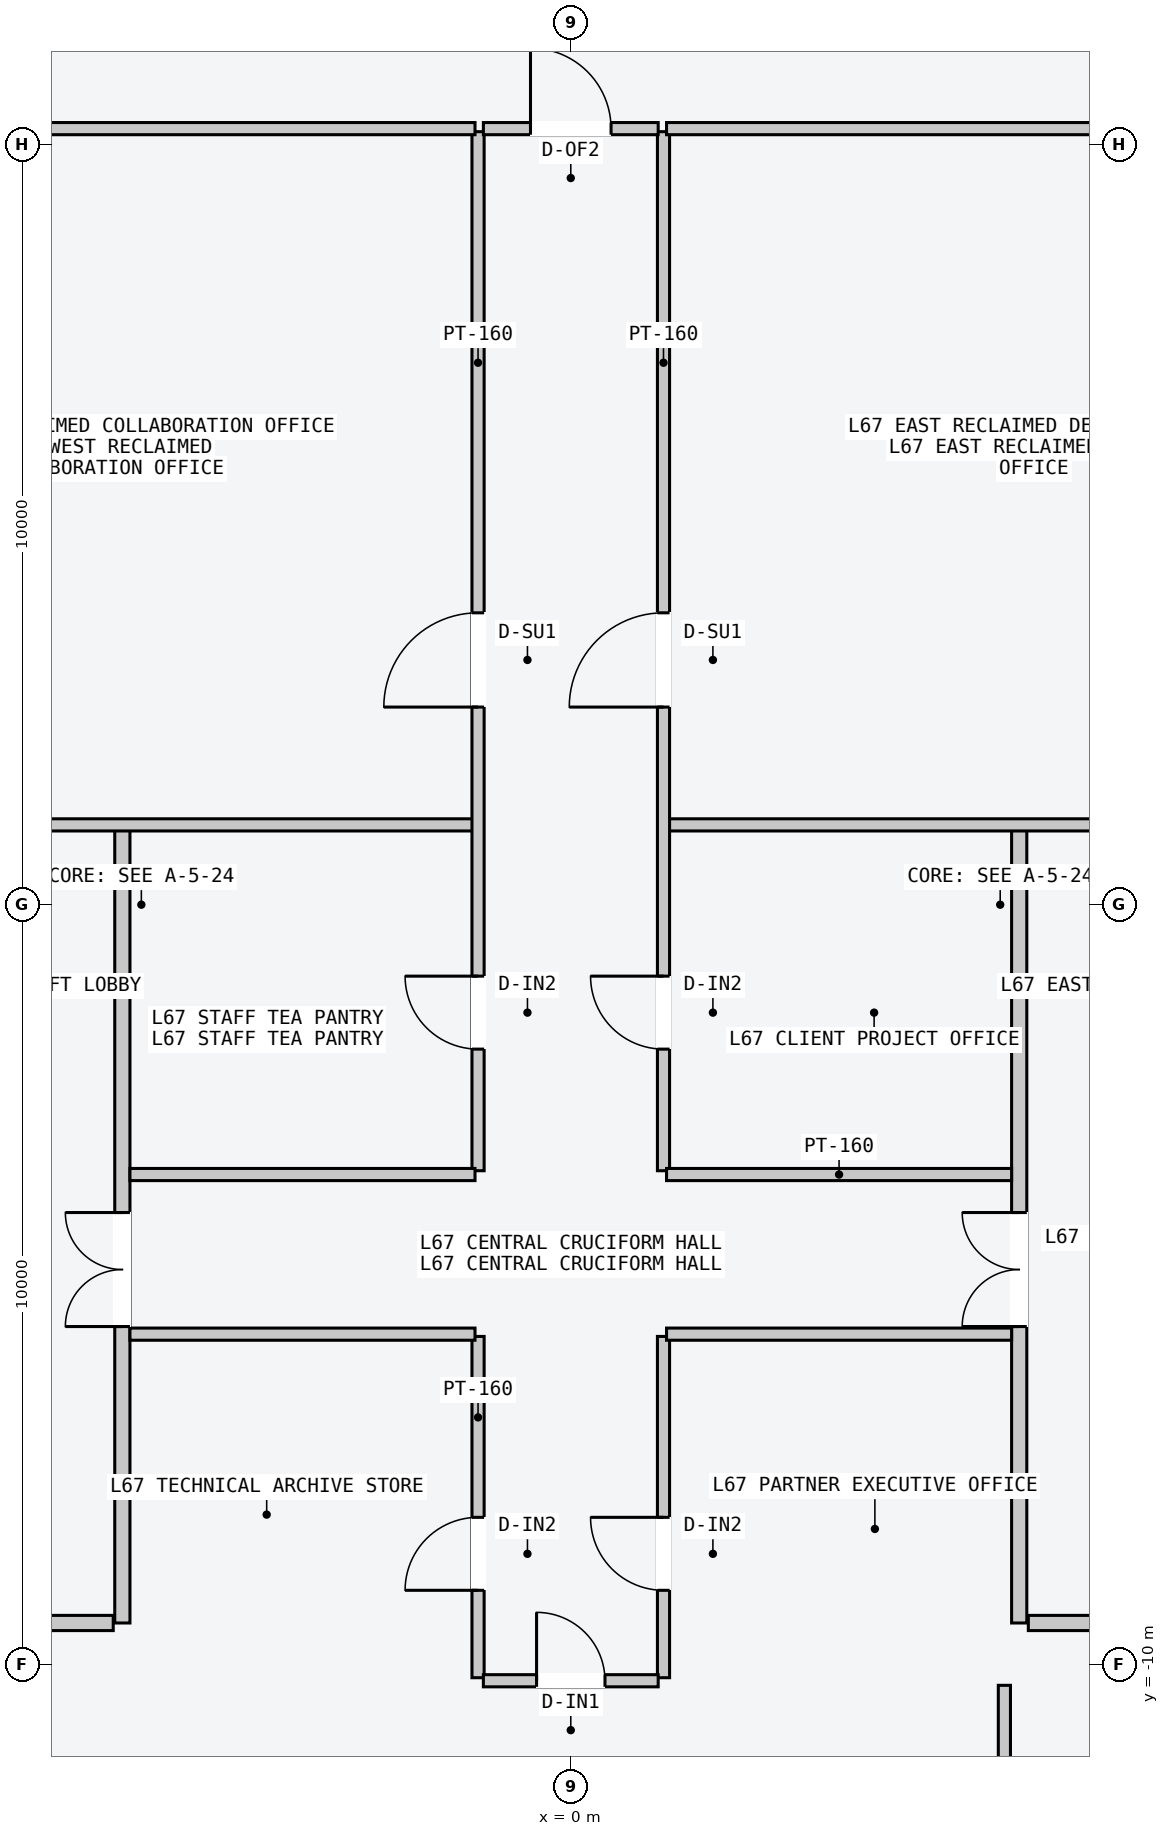
"""IFC4 building model, lengths in metres.
Left out: names, types, materials, properties, quantities, classifications, styles, units other than length and angle.
Written with IfcOpenShell. Run it as: python <this file> out.ifc"""

import sys

from ifc_helpers import new_model, si_unit, direction, frame, frame_2d, origin, place, context, subcontext, project, spatial, rectangle, extrude, element, fill, save


model = new_model("IFC4")
c1 = context("Model", 3, precision=1e-05, world=origin(), true_north=direction((0.0, 1.0)))
c2 = subcontext(c1, "Body", "Model", "MODEL_VIEW")
j1 = project(units=[si_unit("LENGTHUNIT", "METRE"), si_unit("PLANEANGLEUNIT", "RADIAN")], contexts=[c1])
p1 = place(None, origin())
s1 = spatial("IfcSite", under=j1, at=p1, CompositionType="ELEMENT")
p2 = place(p1, origin())
s2 = spatial("IfcBuilding", under=s1, at=p2, CompositionType="ELEMENT")
p3 = place(p2, frame((0.0, 0.0, 254.4)))
s3 = spatial("IfcBuildingStorey", under=s2, at=p3, CompositionType="ELEMENT", Elevation=254.4)
p4 = place(p3, frame((-5.9, -9.45, 0.0), z_axis=(0.0, 0.0, 1.0), x_axis=(0.0, 1.0, 0.0)))
e1 = element("IfcWall", 1, at=p4, inside=s3, PredefinedType="PARTITIONING", context=c2, shape_type="SweptSolid", body=[
    extrude(rectangle(XDim=10.5, YDim=0.2, at=frame_2d((5.25, 0.0))), origin(), (0.0, 0.0, 1.0), 3.4),
])
p5 = place(p4, frame((3.9, 0.0, 0.0)))
e2 = element("IfcOpeningElement", 2, at=p5, cuts=e1, PredefinedType="OPENING", context=c2, shape_type="SweptSolid", body=[
    extrude(rectangle(XDim=1.5, YDim=2.2, at=frame_2d((0.75, 1.1))), frame((0.0, 0.11, 0.0), z_axis=(0.0, -1.0, 0.0), x_axis=(1.0, 0.0, 0.0)), (0.0, 0.0, 1.0), 0.22),
])
p6 = place(p3, frame((-6.02, -9.45, 0.0), z_axis=(0.0, 0.0, 1.0), x_axis=(-1.0, 0.0, 0.0)))
e3 = element("IfcWall", 3, at=p6, inside=s3, PredefinedType="PARTITIONING", context=c2, shape_type="SweptSolid", body=[
    extrude(rectangle(XDim=1.8, YDim=0.2, at=frame_2d((0.9, 0.0))), origin(), (0.0, 0.0, 1.0), 3.4),
])
p7 = place(p3, frame((5.9, -9.45, 0.0), z_axis=(0.0, 0.0, 1.0), x_axis=(0.0, 1.0, 0.0)))
e4 = element("IfcWall", 4, at=p7, inside=s3, PredefinedType="PARTITIONING", context=c2, shape_type="SweptSolid", body=[
    extrude(rectangle(XDim=10.5, YDim=0.2, at=frame_2d((5.25, 0.0))), origin(), (0.0, 0.0, 1.0), 3.4),
])
p8 = place(p7, frame((3.9, 0.0, 0.0)))
e5 = element("IfcOpeningElement", 5, at=p8, cuts=e4, PredefinedType="OPENING", context=c2, shape_type="SweptSolid", body=[
    extrude(rectangle(XDim=1.5, YDim=2.2, at=frame_2d((0.75, 1.1))), frame((0.0, 0.11, 0.0), z_axis=(0.0, -1.0, 0.0), x_axis=(1.0, 0.0, 0.0)), (0.0, 0.0, 1.0), 0.22),
])
p9 = place(p3, frame((6.02, -9.45, 0.0), z_axis=(0.0, 0.0, 1.0), x_axis=(1.0, 0.0, 0.0)))
e6 = element("IfcWall", 6, at=p9, inside=s3, PredefinedType="PARTITIONING", context=c2, shape_type="SweptSolid", body=[
    extrude(rectangle(XDim=1.8, YDim=0.2, at=frame_2d((0.9, 0.0))), origin(), (0.0, 0.0, 1.0), 3.4),
])
p10 = place(p3, frame((-10.05, 1.05, 0.0), z_axis=(0.0, 0.0, 1.0), x_axis=(1.0, 0.0, 0.0)))
e7 = element("IfcWall", 7, at=p10, inside=s3, PredefinedType="PARTITIONING", context=c2, shape_type="SweptSolid", body=[
    extrude(rectangle(XDim=8.79, YDim=0.16, at=frame_2d((4.395, 0.0))), origin(), (0.0, 0.0, 1.0), 3.4),
])
p11 = place(p3, frame((-1.22, -3.5, 0.0), z_axis=(0.0, 0.0, 1.0), x_axis=(0.0, 1.0, 0.0)))
e8 = element("IfcWall", 8, at=p11, inside=s3, PredefinedType="PARTITIONING", context=c2, shape_type="SweptSolid", body=[
    extrude(rectangle(XDim=13.67, YDim=0.16, at=frame_2d((6.835, 0.0))), origin(), (0.0, 0.0, 1.0), 3.4),
])
p12 = place(p11, frame((6.1, 0.0, 0.0)))
e9 = element("IfcOpeningElement", 9, at=p12, cuts=e8, PredefinedType="OPENING", context=c2, shape_type="SweptSolid", body=[
    extrude(rectangle(XDim=1.24, YDim=2.24, at=frame_2d((0.62, 1.12))), frame((0.0, 0.09, 0.0), z_axis=(0.0, -1.0, 0.0), x_axis=(1.0, 0.0, 0.0)), (0.0, 0.0, 1.0), 0.18),
])
p13 = place(p11, frame((1.6, 0.0, 0.0)))
e10 = element("IfcOpeningElement", 10, at=p13, cuts=e8, PredefinedType="OPENING", context=c2, shape_type="SweptSolid", body=[
    extrude(rectangle(XDim=0.96, YDim=2.18, at=frame_2d((0.48, 1.09))), frame((0.0, 0.09, 0.0), z_axis=(0.0, -1.0, 0.0), x_axis=(1.0, 0.0, 0.0)), (0.0, 0.0, 1.0), 0.18),
])
p14 = place(p3, frame((-7.5, 10.21, 0.0), z_axis=(0.0, 0.0, 1.0), x_axis=(1.0, 0.0, 0.0)))
e11 = element("IfcWall", 11, at=p14, inside=s3, PredefinedType="PARTITIONING", context=c2, shape_type="SweptSolid", body=[
    extrude(rectangle(XDim=6.24, YDim=0.16, at=frame_2d((3.12, 0.0))), origin(), (0.0, 0.0, 1.0), 3.4),
])
p15 = place(p3, frame((-5.8, -3.55, 0.0), z_axis=(0.0, 0.0, 1.0), x_axis=(1.0, 0.0, 0.0)))
e12 = element("IfcWall", 12, at=p15, inside=s3, PredefinedType="PARTITIONING", context=c2, shape_type="SweptSolid", body=[
    extrude(rectangle(XDim=4.54, YDim=0.16, at=frame_2d((2.27, 0.0))), origin(), (0.0, 0.0, 1.0), 3.4),
])
p16 = place(p3, frame((1.26, 1.05, 0.0), z_axis=(0.0, 0.0, 1.0), x_axis=(1.0, 0.0, 0.0)))
e13 = element("IfcWall", 13, at=p16, inside=s3, PredefinedType="PARTITIONING", context=c2, shape_type="SweptSolid", body=[
    extrude(rectangle(XDim=8.8, YDim=0.16, at=frame_2d((4.4, 0.0))), origin(), (0.0, 0.0, 1.0), 3.4),
])
p17 = place(p3, frame((1.22, -3.5, 0.0), z_axis=(0.0, 0.0, 1.0), x_axis=(0.0, 1.0, 0.0)))
e14 = element("IfcWall", 14, at=p17, inside=s3, PredefinedType="PARTITIONING", context=c2, shape_type="SweptSolid", body=[
    extrude(rectangle(XDim=13.67, YDim=0.16, at=frame_2d((6.835, 0.0))), origin(), (0.0, 0.0, 1.0), 3.4),
])
p18 = place(p17, frame((6.1, 0.0, 0.0)))
e15 = element("IfcOpeningElement", 15, at=p18, cuts=e14, PredefinedType="OPENING", context=c2, shape_type="SweptSolid", body=[
    extrude(rectangle(XDim=1.24, YDim=2.24, at=frame_2d((0.62, 1.12))), frame((0.0, 0.09, 0.0), z_axis=(0.0, -1.0, 0.0), x_axis=(1.0, 0.0, 0.0)), (0.0, 0.0, 1.0), 0.18),
])
p19 = place(p17, frame((1.6, 0.0, 0.0)))
e16 = element("IfcOpeningElement", 16, at=p19, cuts=e14, PredefinedType="OPENING", context=c2, shape_type="SweptSolid", body=[
    extrude(rectangle(XDim=0.96, YDim=2.18, at=frame_2d((0.48, 1.09))), frame((0.0, 0.09, 0.0), z_axis=(0.0, -1.0, 0.0), x_axis=(1.0, 0.0, 0.0)), (0.0, 0.0, 1.0), 0.18),
])
p20 = place(p3, frame((1.26, 10.21, 0.0), z_axis=(0.0, 0.0, 1.0), x_axis=(1.0, 0.0, 0.0)))
e17 = element("IfcWall", 17, at=p20, inside=s3, PredefinedType="PARTITIONING", context=c2, shape_type="SweptSolid", body=[
    extrude(rectangle(XDim=6.24, YDim=0.16, at=frame_2d((3.12, 0.0))), origin(), (0.0, 0.0, 1.0), 3.4),
])
p21 = place(p3, frame((1.26, -3.55, 0.0), z_axis=(0.0, 0.0, 1.0), x_axis=(1.0, 0.0, 0.0)))
e18 = element("IfcWall", 18, at=p21, inside=s3, PredefinedType="PARTITIONING", context=c2, shape_type="SweptSolid", body=[
    extrude(rectangle(XDim=4.54, YDim=0.16, at=frame_2d((2.27, 0.0))), origin(), (0.0, 0.0, 1.0), 3.4),
])
p22 = place(p3, frame((-1.22, -10.17, 0.0), z_axis=(0.0, 0.0, 1.0), x_axis=(0.0, 1.0, 0.0)))
e19 = element("IfcWall", 19, at=p22, inside=s3, PredefinedType="PARTITIONING", context=c2, shape_type="SweptSolid", body=[
    extrude(rectangle(XDim=4.49, YDim=0.16, at=frame_2d((2.245, 0.0))), origin(), (0.0, 0.0, 1.0), 3.4),
])
p23 = place(p22, frame((1.15, 0.0, 0.0)))
e20 = element("IfcOpeningElement", 20, at=p23, cuts=e19, PredefinedType="OPENING", context=c2, shape_type="SweptSolid", body=[
    extrude(rectangle(XDim=0.96, YDim=2.18, at=frame_2d((0.48, 1.09))), frame((0.0, 0.09, 0.0), z_axis=(0.0, -1.0, 0.0), x_axis=(1.0, 0.0, 0.0)), (0.0, 0.0, 1.0), 0.18),
])
p24 = place(p3, frame((1.22, -10.17, 0.0), z_axis=(0.0, 0.0, 1.0), x_axis=(0.0, 1.0, 0.0)))
e21 = element("IfcWall", 21, at=p24, inside=s3, PredefinedType="PARTITIONING", context=c2, shape_type="SweptSolid", body=[
    extrude(rectangle(XDim=4.49, YDim=0.16, at=frame_2d((2.245, 0.0))), origin(), (0.0, 0.0, 1.0), 3.4),
])
p25 = place(p24, frame((1.15, 0.0, 0.0)))
e22 = element("IfcOpeningElement", 22, at=p25, cuts=e21, PredefinedType="OPENING", context=c2, shape_type="SweptSolid", body=[
    extrude(rectangle(XDim=0.96, YDim=2.18, at=frame_2d((0.48, 1.09))), frame((0.0, 0.09, 0.0), z_axis=(0.0, -1.0, 0.0), x_axis=(1.0, 0.0, 0.0)), (0.0, 0.0, 1.0), 0.18),
])
for number, where, z_axis, x_axis in (
    (23, (-5.8, -5.65, 0.0), (0.0, 0.0, 1.0), (1.0, 0.0, 0.0)),
    (24, (1.26, -5.65, 0.0), (0.0, 0.0, 1.0), (1.0, 0.0, 0.0)),
):
    element("IfcWall", number, at=place(p3, frame(where, z_axis=z_axis, x_axis=x_axis)), inside=s3, PredefinedType="PARTITIONING", context=c2, shape_type="SweptSolid", body=[
        extrude(rectangle(XDim=4.54, YDim=0.16, at=frame_2d((2.27, 0.0))), origin(), (0.0, 0.0, 1.0), 3.4),
    ])
p26 = place(p3, frame((-1.15, 10.21, 0.0), z_axis=(0.0, 0.0, 1.0), x_axis=(1.0, 0.0, 0.0)))
e25 = element("IfcWall", 25, at=p26, inside=s3, PredefinedType="PARTITIONING", context=c2, shape_type="SweptSolid", body=[
    extrude(rectangle(XDim=2.3, YDim=0.16, at=frame_2d((1.15, 0.0))), origin(), (0.0, 0.0, 1.0), 3.4),
])
p27 = place(p26, frame((0.62, 0.0, 0.0)))
e26 = element("IfcOpeningElement", 26, at=p27, cuts=e25, PredefinedType="OPENING", context=c2, shape_type="SweptSolid", body=[
    extrude(rectangle(XDim=1.06, YDim=2.2, at=frame_2d((0.53, 1.1))), frame((0.0, 0.09, 0.0), z_axis=(0.0, -1.0, 0.0), x_axis=(1.0, 0.0, 0.0)), (0.0, 0.0, 1.0), 0.18),
])
p28 = place(p3, frame((5.705, -17.56, 0.0), z_axis=(0.0, 0.0, 1.0), x_axis=(0.0, 1.0, 0.0)))
e27 = element("IfcWall", 27, at=p28, inside=s3, PredefinedType="PARTITIONING", context=c2, shape_type="SweptSolid", body=[
    extrude(rectangle(XDim=7.29, YDim=0.16, at=frame_2d((3.645, 0.0))), origin(), (0.0, 0.0, 1.0), 3.4),
])
p29 = place(p28, frame((1.05, 0.0, 0.0)))
e28 = element("IfcOpeningElement", 28, at=p29, cuts=e27, PredefinedType="OPENING", context=c2, shape_type="SweptSolid", body=[
    extrude(rectangle(XDim=0.96, YDim=2.18, at=frame_2d((0.48, 1.09))), frame((0.0, 0.09, 0.0), z_axis=(0.0, -1.0, 0.0), x_axis=(1.0, 0.0, 0.0)), (0.0, 0.0, 1.0), 0.18),
])
p30 = place(p3, frame((-1.15, -10.21, 0.0), z_axis=(0.0, 0.0, 1.0), x_axis=(1.0, 0.0, 0.0)))
e29 = element("IfcWall", 29, at=p30, inside=s3, PredefinedType="PARTITIONING", context=c2, shape_type="SweptSolid", body=[
    extrude(rectangle(XDim=2.3, YDim=0.16, at=frame_2d((1.15, 0.0))), origin(), (0.0, 0.0, 1.0), 3.4),
])
p31 = place(p30, frame((0.7, 0.0, 0.0)))
e30 = element("IfcOpeningElement", 30, at=p31, cuts=e29, PredefinedType="OPENING", context=c2, shape_type="SweptSolid", body=[
    extrude(rectangle(XDim=0.9, YDim=2.15, at=frame_2d((0.45, 1.075))), frame((0.0, 0.09, 0.0), z_axis=(0.0, -1.0, 0.0), x_axis=(1.0, 0.0, 0.0)), (0.0, 0.0, 1.0), 0.18),
])
p32 = place(p5, origin())
e31 = element("IfcDoor", 31, at=p32, inside=s3, OperationType="DOUBLE_DOOR_SINGLE_SWING", PredefinedType="DOOR", context=c2, shape_type="SweptSolid", body=[
    extrude(rectangle(XDim=1.5, YDim=2.2, at=frame_2d((0.75, 1.1))), frame((0.0, 0.025, 0.0), z_axis=(0.0, -1.0, 0.0), x_axis=(1.0, 0.0, 0.0)), (0.0, 0.0, 1.0), 0.05),
])
fill(e2, e31)
p33 = place(p8, origin())
e32 = element("IfcDoor", 32, at=p33, inside=s3, OperationType="DOUBLE_DOOR_SINGLE_SWING", PredefinedType="DOOR", context=c2, shape_type="SweptSolid", body=[
    extrude(rectangle(XDim=1.5, YDim=2.2, at=frame_2d((0.75, 1.1))), frame((0.0, 0.025, 0.0), z_axis=(0.0, -1.0, 0.0), x_axis=(1.0, 0.0, 0.0)), (0.0, 0.0, 1.0), 0.05),
])
fill(e5, e32)
p34 = place(p12, origin())
e33 = element("IfcDoor", 33, at=p34, inside=s3, OperationType="SINGLE_SWING_LEFT", PredefinedType="DOOR", context=c2, shape_type="SweptSolid", body=[
    extrude(rectangle(XDim=1.24, YDim=2.24, at=frame_2d((0.62, 1.12))), frame((0.0, 0.025, 0.0), z_axis=(0.0, -1.0, 0.0), x_axis=(1.0, 0.0, 0.0)), (0.0, 0.0, 1.0), 0.05),
])
fill(e9, e33)
p35 = place(p13, origin())
e34 = element("IfcDoor", 34, at=p35, inside=s3, OperationType="SINGLE_SWING_RIGHT", PredefinedType="DOOR", context=c2, shape_type="SweptSolid", body=[
    extrude(rectangle(XDim=0.96, YDim=2.18, at=frame_2d((0.48, 1.09))), frame((0.0, 0.025, 0.0), z_axis=(0.0, -1.0, 0.0), x_axis=(1.0, 0.0, 0.0)), (0.0, 0.0, 1.0), 0.05),
])
fill(e10, e34)
p36 = place(p18, origin())
e35 = element("IfcDoor", 35, at=p36, inside=s3, OperationType="SINGLE_SWING_LEFT", PredefinedType="DOOR", context=c2, shape_type="SweptSolid", body=[
    extrude(rectangle(XDim=1.24, YDim=2.24, at=frame_2d((0.62, 1.12))), frame((0.0, 0.025, 0.0), z_axis=(0.0, -1.0, 0.0), x_axis=(1.0, 0.0, 0.0)), (0.0, 0.0, 1.0), 0.05),
])
fill(e15, e35)
p37 = place(p19, origin())
e36 = element("IfcDoor", 36, at=p37, inside=s3, OperationType="SINGLE_SWING_RIGHT", PredefinedType="DOOR", context=c2, shape_type="SweptSolid", body=[
    extrude(rectangle(XDim=0.96, YDim=2.18, at=frame_2d((0.48, 1.09))), frame((0.0, 0.025, 0.0), z_axis=(0.0, -1.0, 0.0), x_axis=(1.0, 0.0, 0.0)), (0.0, 0.0, 1.0), 0.05),
])
fill(e16, e36)
p38 = place(p23, origin())
e37 = element("IfcDoor", 37, at=p38, inside=s3, OperationType="SINGLE_SWING_LEFT", PredefinedType="DOOR", context=c2, shape_type="SweptSolid", body=[
    extrude(rectangle(XDim=0.96, YDim=2.18, at=frame_2d((0.48, 1.09))), frame((0.0, 0.025, 0.0), z_axis=(0.0, -1.0, 0.0), x_axis=(1.0, 0.0, 0.0)), (0.0, 0.0, 1.0), 0.05),
])
fill(e20, e37)
p39 = place(p25, origin())
e38 = element("IfcDoor", 38, at=p39, inside=s3, OperationType="SINGLE_SWING_RIGHT", PredefinedType="DOOR", context=c2, shape_type="SweptSolid", body=[
    extrude(rectangle(XDim=0.96, YDim=2.18, at=frame_2d((0.48, 1.09))), frame((0.0, 0.025, 0.0), z_axis=(0.0, -1.0, 0.0), x_axis=(1.0, 0.0, 0.0)), (0.0, 0.0, 1.0), 0.05),
])
fill(e22, e38)
p40 = place(p27, origin())
e39 = element("IfcDoor", 39, at=p40, inside=s3, OperationType="SINGLE_SWING_LEFT", PredefinedType="DOOR", context=c2, shape_type="SweptSolid", body=[
    extrude(rectangle(XDim=1.06, YDim=2.2, at=frame_2d((0.53, 1.1))), frame((0.0, 0.025, 0.0), z_axis=(0.0, -1.0, 0.0), x_axis=(1.0, 0.0, 0.0)), (0.0, 0.0, 1.0), 0.05),
])
fill(e26, e39)
p41 = place(p31, origin())
e40 = element("IfcDoor", 40, at=p41, inside=s3, OperationType="SINGLE_SWING_LEFT", PredefinedType="DOOR", context=c2, shape_type="SweptSolid", body=[
    extrude(rectangle(XDim=0.9, YDim=2.15, at=frame_2d((0.45, 1.075))), frame((0.0, 0.025, 0.0), z_axis=(0.0, -1.0, 0.0), x_axis=(1.0, 0.0, 0.0)), (0.0, 0.0, 1.0), 0.05),
])
fill(e30, e40)
save(model, sys.argv[1])
